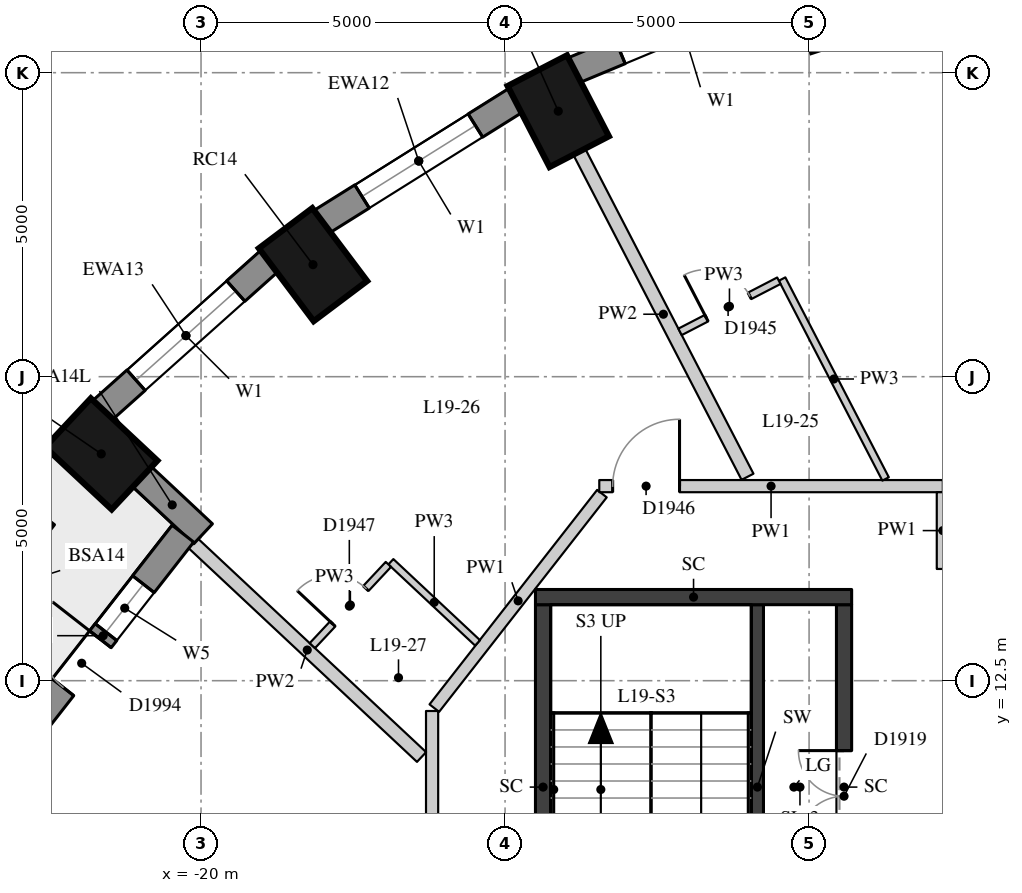
"""IFC4 building model, lengths in metres.
Left out: names, types, materials, properties, quantities, classifications, styles, units other than length and angle.
Written with IfcOpenShell. Run it as: python <this file> out.ifc"""

import sys

from ifc_helpers import new_model, si_unit, direction, frame, frame_2d, origin, origin_2d, place, context, subcontext, project, spatial, rectangle, extrude, element, fill, save


model = new_model("IFC4")
c1 = context("Model", 3, precision=1e-05, world=origin(), true_north=direction((0.0, 1.0)))
c2 = subcontext(c1, "Body", "Model", "MODEL_VIEW")
j1 = project(units=[si_unit("LENGTHUNIT", "METRE"), si_unit("PLANEANGLEUNIT", "RADIAN")], contexts=[c1])
p1 = place(None, origin())
s1 = spatial("IfcSite", under=j1, at=p1, CompositionType="ELEMENT")
p2 = place(p1, origin())
s2 = spatial("IfcBuilding", under=s1, at=p2, CompositionType="ELEMENT")
p3 = place(p2, frame((0.0, 0.0, 71.2)))
s3 = spatial("IfcBuildingStorey", under=s2, at=p3, CompositionType="ELEMENT", Elevation=71.2)
for number, where, z_axis, x_axis in (
    (1, (-14.125, 21.867, 0.0), (0.0, 0.0, 1.0), (-0.46, 0.888, 0.0)),
    (2, (-18.159, 19.343, 0.0), (0.0, 0.0, 1.0), (-0.601, 0.799, 0.0)),
    (3, (-21.641, 16.23, 0.0), (0.0, 0.0, 1.0), (-0.73, 0.683, 0.0)),
):
    element("IfcColumn", number, at=place(p3, frame(where, z_axis=z_axis, x_axis=x_axis)), inside=s3, PredefinedType="COLUMN", context=c2, shape_type="SweptSolid", body=[
        extrude(rectangle(XDim=1.5, YDim=1.1, at=origin_2d()), origin(), (0.0, 0.0, 1.0), 3.3),
    ])
p4 = place(p3, frame((-10.315, 24.021, 0.0), z_axis=(0.0, 0.0, 1.0), x_axis=(-0.923031964282, -0.384723267966, 0.0)))
e4 = element("IfcWall", 4, at=p4, inside=s3, PredefinedType="SOLIDWALL", context=c2, shape_type="SweptSolid", body=[
    extrude(rectangle(XDim=3.856, YDim=0.45, at=frame_2d((1.928, 0.0))), origin(), (0.0, 0.0, 1.0), 3.02),
])
p5 = place(p4, frame((0.828, 0.0, 0.4)))
e5 = element("IfcOpeningElement", 5, at=p5, cuts=e4, PredefinedType="OPENING", context=c2, shape_type="SweptSolid", body=[
    extrude(rectangle(XDim=2.2, YDim=1.75, at=frame_2d((1.1, 0.875))), frame((0.0, 0.235, 0.0), z_axis=(0.0, -1.0, 0.0), x_axis=(1.0, 0.0, 0.0)), (0.0, 0.0, 1.0), 0.47),
])
p6 = place(p3, frame((-14.817, 22.051, 0.0), z_axis=(0.0, 0.0, 1.0), x_axis=(-0.847635480093, -0.530579016629, 0.0)))
e6 = element("IfcWall", 6, at=p6, inside=s3, PredefinedType="SOLIDWALL", context=c2, shape_type="SweptSolid", body=[
    extrude(rectangle(XDim=3.782, YDim=0.45, at=frame_2d((1.891, 0.0))), origin(), (0.0, 0.0, 1.0), 3.02),
])
p7 = place(p6, frame((0.791, 0.0, 0.4)))
e7 = element("IfcOpeningElement", 7, at=p7, cuts=e6, PredefinedType="OPENING", context=c2, shape_type="SweptSolid", body=[
    extrude(rectangle(XDim=2.2, YDim=1.75, at=frame_2d((1.1, 0.875))), frame((0.0, 0.235, 0.0), z_axis=(0.0, -1.0, 0.0), x_axis=(1.0, 0.0, 0.0)), (0.0, 0.0, 1.0), 0.47),
])
p8 = place(p3, frame((-18.871, 19.407, 0.0), z_axis=(0.0, 0.0, 1.0), x_axis=(-0.745526233716, -0.66647628228, 0.0)))
e8 = element("IfcWall", 8, at=p8, inside=s3, PredefinedType="SOLIDWALL", context=c2, shape_type="SweptSolid", body=[
    extrude(rectangle(XDim=3.697, YDim=0.45, at=frame_2d((1.848, 0.0))), origin(), (0.0, 0.0, 1.0), 3.02),
])
p9 = place(p8, frame((0.749, 0.0, 0.4)))
e9 = element("IfcOpeningElement", 9, at=p9, cuts=e8, PredefinedType="OPENING", context=c2, shape_type="SweptSolid", body=[
    extrude(rectangle(XDim=2.2, YDim=1.75, at=frame_2d((1.1, 0.875))), frame((0.0, 0.235, 0.0), z_axis=(0.0, -1.0, 0.0), x_axis=(1.0, 0.0, 0.0)), (0.0, 0.0, 1.0), 0.47),
])
p10 = place(p3, frame((-20.982, 15.866, 0.0), z_axis=(0.0, 0.0, 1.0), x_axis=(0.730062381614, -0.683380508174, 0.0)))
e10 = element("IfcWall", 10, at=p10, inside=s3, PredefinedType="SOLIDWALL", context=c2, shape_type="SweptSolid", body=[
    extrude(rectangle(XDim=1.391, YDim=0.45, at=frame_2d((0.696, 0.0))), origin(), (0.0, 0.0, 1.0), 3.02),
])
p11 = place(p3, frame((-20.298, 14.918, 0.0), z_axis=(0.0, 0.0, 1.0), x_axis=(-0.615578403957, -0.788075649022, 0.0)))
e11 = element("IfcWall", 11, at=p11, inside=s3, PredefinedType="SOLIDWALL", context=c2, shape_type="SweptSolid", body=[
    extrude(rectangle(XDim=4.259, YDim=0.45, at=frame_2d((2.129, 0.0))), origin(), (0.0, 0.0, 1.0), 3.02),
])
p12 = place(p11, frame((1.054, 0.0, 0.4)))
e12 = element("IfcOpeningElement", 12, at=p12, cuts=e11, PredefinedType="OPENING", context=c2, shape_type="SweptSolid", body=[
    extrude(rectangle(XDim=1.0, YDim=1.75, at=frame_2d((0.5, 0.875))), frame((0.0, 0.235, 0.0), z_axis=(0.0, -1.0, 0.0), x_axis=(1.0, 0.0, 0.0)), (0.0, 0.0, 1.0), 0.47),
])
p13 = place(p11, frame((2.204, 0.0, 0.0)))
e13 = element("IfcOpeningElement", 13, at=p13, cuts=e11, PredefinedType="OPENING", context=c2, shape_type="SweptSolid", body=[
    extrude(rectangle(XDim=1.0, YDim=2.15, at=frame_2d((0.5, 1.075))), frame((0.0, 0.235, 0.0), z_axis=(0.0, -1.0, 0.0), x_axis=(1.0, 0.0, 0.0)), (0.0, 0.0, 1.0), 0.47),
])
p14 = place(p3, frame((-22.686, 15.281, 0.0), z_axis=(0.0, 0.0, 1.0), x_axis=(-0.616622746332, -0.787258781282, 0.0)))
e14 = element("IfcWall", 14, at=p14, inside=s3, PredefinedType="USERDEFINED", context=c2, shape_type="SweptSolid", body=[
    extrude(rectangle(XDim=1.8, YDim=0.7, at=frame_2d((0.9, 0.0))), origin(), (0.0, 0.0, 1.0), 0.75),
])
p15 = place(p3, frame((-10.85, 7.75, 0.0), z_axis=(0.0, 0.0, 1.0), x_axis=(0.0, 1.0, 0.0)))
e15 = element("IfcWall", 15, at=p15, inside=s3, PredefinedType="SHEAR", context=c2, shape_type="SweptSolid", body=[
    extrude(rectangle(XDim=6.0, YDim=0.2, at=frame_2d((3.0, 0.0))), origin(), (0.0, 0.0, 1.0), 3.02),
])
p16 = place(p15, frame((0.1, 0.0, 0.0)))
e16 = element("IfcOpeningElement", 16, at=p16, cuts=e15, PredefinedType="OPENING", context=c2, shape_type="SweptSolid", body=[
    extrude(rectangle(XDim=1.5, YDim=2.1, at=frame_2d((0.75, 1.05))), frame((0.0, 0.11, 0.0), z_axis=(0.0, -1.0, 0.0), x_axis=(1.0, 0.0, 0.0)), (0.0, 0.0, 1.0), 0.22),
])
p17 = place(p3, frame((-14.375, 7.75, -0.28), z_axis=(0.0, 0.0, 1.0), x_axis=(0.0, 1.0, 0.0)))
e17 = element("IfcWall", 17, at=p17, inside=s3, PredefinedType="SHEAR", context=c2, shape_type="SweptSolid", body=[
    extrude(rectangle(XDim=6.0, YDim=0.25, at=frame_2d((3.0, 0.0))), origin(), (0.0, 0.0, 1.0), 3.3),
])
p18 = place(p3, frame((-9.425, 7.75, -0.28), z_axis=(0.0, 0.0, 1.0), x_axis=(0.0, 1.0, 0.0)))
e18 = element("IfcWall", 18, at=p18, inside=s3, PredefinedType="SHEAR", context=c2, shape_type="SweptSolid", body=[
    extrude(rectangle(XDim=6.0, YDim=0.25, at=frame_2d((3.0, 0.0))), origin(), (0.0, 0.0, 1.0), 3.3),
])
p19 = place(p18, frame((2.1, 0.0, 0.28)))
e19 = element("IfcOpeningElement", 19, at=p19, cuts=e18, PredefinedType="OPENING", context=c2, shape_type="SweptSolid", body=[
    extrude(rectangle(XDim=1.5, YDim=2.1, at=frame_2d((0.75, 1.05))), frame((0.0, 0.135, 0.0), z_axis=(0.0, -1.0, 0.0), x_axis=(1.0, 0.0, 0.0)), (0.0, 0.0, 1.0), 0.27),
])
p20 = place(p3, frame((-14.5, 13.875, -0.28), z_axis=(0.0, 0.0, 1.0), x_axis=(1.0, 0.0, 0.0)))
e20 = element("IfcWall", 20, at=p20, inside=s3, PredefinedType="SHEAR", context=c2, shape_type="SweptSolid", body=[
    extrude(rectangle(XDim=5.2, YDim=0.25, at=frame_2d((2.6, 0.0))), origin(), (0.0, 0.0, 1.0), 3.3),
])
p21 = place(p3, frame((-16.2, 7.298, 0.0), z_axis=(0.0, 0.0, 1.0), x_axis=(0.0, 1.0, 0.0)))
e21 = element("IfcWall", 21, at=p21, inside=s3, PredefinedType="PARTITIONING", context=c2, shape_type="SweptSolid", body=[
    extrude(rectangle(XDim=4.703, YDim=0.2, at=frame_2d((2.352, 0.0))), origin(), (0.0, 0.0, 1.0), 3.02),
])
p22 = place(p3, frame((-16.163, 12.049, 0.0), z_axis=(0.0, 0.0, 1.0), x_axis=(0.6157435057, 0.787946657578, 0.0)))
e22 = element("IfcWall", 22, at=p22, inside=s3, PredefinedType="PARTITIONING", context=c2, shape_type="SweptSolid", body=[
    extrude(rectangle(XDim=4.477, YDim=0.2, at=frame_2d((2.239, 0.0))), origin(), (0.0, 0.0, 1.0), 3.02),
])
p23 = place(p3, frame((-13.45, 15.7, 0.0), z_axis=(0.0, 0.0, 1.0), x_axis=(1.0, 0.0, 0.0)))
e23 = element("IfcWall", 23, at=p23, inside=s3, PredefinedType="PARTITIONING", context=c2, shape_type="SweptSolid", body=[
    extrude(rectangle(XDim=5.65, YDim=0.2, at=frame_2d((2.825, 0.0))), origin(), (0.0, 0.0, 1.0), 3.02),
])
p24 = place(p23, frame((0.22, 0.0, 0.0)))
e24 = element("IfcOpeningElement", 24, at=p24, cuts=e23, PredefinedType="OPENING", context=c2, shape_type="SweptSolid", body=[
    extrude(rectangle(XDim=1.1, YDim=2.1, at=frame_2d((0.55, 1.05))), frame((0.0, 0.11, 0.0), z_axis=(0.0, -1.0, 0.0), x_axis=(1.0, 0.0, 0.0)), (0.0, 0.0, 1.0), 0.22),
])
p25 = place(p3, frame((-7.8, 15.6, 0.0), z_axis=(0.0, 0.0, 1.0), x_axis=(0.0, -1.0, 0.0)))
e25 = element("IfcWall", 25, at=p25, inside=s3, PredefinedType="PARTITIONING", context=c2, shape_type="SweptSolid", body=[
    extrude(rectangle(XDim=1.262, YDim=0.2, at=frame_2d((0.631, 0.0))), origin(), (0.0, 0.0, 1.0), 3.02),
])
p26 = place(p3, frame((-13.78, 21.201, 0.0), z_axis=(0.0, 0.0, 1.0), x_axis=(0.459689820266, -0.888079539875, 0.0)))
e26 = element("IfcWall", 26, at=p26, inside=s3, PredefinedType="PARTITIONING", context=c2, shape_type="SweptSolid", body=[
    extrude(rectangle(XDim=6.021, YDim=0.22, at=frame_2d((3.011, 0.0))), origin(), (0.0, 0.0, 1.0), 3.02),
])
p27 = place(p3, frame((-20.133, 14.764, 0.0), z_axis=(0.0, 0.0, 1.0), x_axis=(0.730092856427, -0.683347950165, 0.0)))
e27 = element("IfcWall", 27, at=p27, inside=s3, PredefinedType="PARTITIONING", context=c2, shape_type="SweptSolid", body=[
    extrude(rectangle(XDim=5.15, YDim=0.22, at=frame_2d((2.575, 0.0))), origin(), (0.0, 0.0, 1.0), 3.02),
])
p28 = place(p3, frame((-8.742, 15.818, 0.0), z_axis=(0.0, 0.0, 1.0), x_axis=(-0.45967225044, 0.888088634189, 0.0)))
e28 = element("IfcWall", 28, at=p28, inside=s3, PredefinedType="PARTITIONING", context=c2, shape_type="SweptSolid", body=[
    extrude(rectangle(XDim=3.702, YDim=0.12, at=frame_2d((1.851, 0.0))), origin(), (0.0, 0.0, 1.0), 3.02),
])
p29 = place(p3, frame((-15.452, 13.122, 0.0), z_axis=(0.0, 0.0, 1.0), x_axis=(-0.730035995084, 0.683408696083, 0.0)))
e29 = element("IfcWall", 29, at=p29, inside=s3, PredefinedType="PARTITIONING", context=c2, shape_type="SweptSolid", body=[
    extrude(rectangle(XDim=1.953, YDim=0.12, at=frame_2d((0.977, 0.0))), origin(), (0.0, 0.0, 1.0), 3.02),
])
p30 = place(p3, frame((-10.497, 19.078, 0.0), z_axis=(0.0, 0.0, 1.0), x_axis=(-0.888095574179, -0.459658842104, 0.0)))
e30 = element("IfcWall", 30, at=p30, inside=s3, PredefinedType="PARTITIONING", context=c2, shape_type="SweptSolid", body=[
    extrude(rectangle(XDim=1.83, YDim=0.12, at=frame_2d((0.915, 0.0))), origin(), (0.0, 0.0, 1.0), 3.02),
])
p31 = place(p30, frame((0.54, 0.0, 0.0)))
e31 = element("IfcOpeningElement", 31, at=p31, cuts=e30, PredefinedType="OPENING", context=c2, shape_type="SweptSolid", body=[
    extrude(rectangle(XDim=0.8, YDim=2.1, at=frame_2d((0.4, 1.05))), frame((0.0, 0.07, 0.0), z_axis=(0.0, -1.0, 0.0), x_axis=(1.0, 0.0, 0.0)), (0.0, 0.0, 1.0), 0.14),
])
p32 = place(p3, frame((-16.919, 14.413, 0.0), z_axis=(0.0, 0.0, 1.0), x_axis=(-0.683306289544, -0.730131847456, 0.0)))
e32 = element("IfcWall", 32, at=p32, inside=s3, PredefinedType="PARTITIONING", context=c2, shape_type="SweptSolid", body=[
    extrude(rectangle(XDim=1.83, YDim=0.12, at=frame_2d((0.915, 0.0))), origin(), (0.0, 0.0, 1.0), 3.02),
])
p33 = place(p32, frame((0.54, 0.0, 0.0)))
e33 = element("IfcOpeningElement", 33, at=p33, cuts=e32, PredefinedType="OPENING", context=c2, shape_type="SweptSolid", body=[
    extrude(rectangle(XDim=0.8, YDim=2.1, at=frame_2d((0.4, 1.05))), frame((0.0, 0.07, 0.0), z_axis=(0.0, -1.0, 0.0), x_axis=(1.0, 0.0, 0.0)), (0.0, 0.0, 1.0), 0.14),
])
p34 = place(p5, origin())
e34 = element("IfcWindow", 34, at=p34, inside=s3, PartitioningType="SINGLE_PANEL", PredefinedType="WINDOW", context=c2, shape_type="SweptSolid", body=[
    extrude(rectangle(XDim=2.2, YDim=1.75, at=frame_2d((1.1, 0.875))), frame((0.0, 0.035, 0.0), z_axis=(0.0, -1.0, 0.0), x_axis=(1.0, 0.0, 0.0)), (0.0, 0.0, 1.0), 0.06),
])
fill(e5, e34)
p35 = place(p7, origin())
e35 = element("IfcWindow", 35, at=p35, inside=s3, PartitioningType="SINGLE_PANEL", PredefinedType="WINDOW", context=c2, shape_type="SweptSolid", body=[
    extrude(rectangle(XDim=2.2, YDim=1.75, at=frame_2d((1.1, 0.875))), frame((0.0, 0.035, 0.0), z_axis=(0.0, -1.0, 0.0), x_axis=(1.0, 0.0, 0.0)), (0.0, 0.0, 1.0), 0.06),
])
fill(e7, e35)
p36 = place(p9, origin())
e36 = element("IfcWindow", 36, at=p36, inside=s3, PartitioningType="SINGLE_PANEL", PredefinedType="WINDOW", context=c2, shape_type="SweptSolid", body=[
    extrude(rectangle(XDim=2.2, YDim=1.75, at=frame_2d((1.1, 0.875))), frame((0.0, 0.035, 0.0), z_axis=(0.0, -1.0, 0.0), x_axis=(1.0, 0.0, 0.0)), (0.0, 0.0, 1.0), 0.06),
])
fill(e9, e36)
p37 = place(p12, origin())
e37 = element("IfcWindow", 37, at=p37, inside=s3, PartitioningType="SINGLE_PANEL", PredefinedType="WINDOW", context=c2, shape_type="SweptSolid", body=[
    extrude(rectangle(XDim=1.0, YDim=1.75, at=frame_2d((0.5, 0.875))), frame((0.0, 0.035, 0.0), z_axis=(0.0, -1.0, 0.0), x_axis=(1.0, 0.0, 0.0)), (0.0, 0.0, 1.0), 0.06),
])
fill(e12, e37)
p38 = place(p13, frame((1.0, 0.0, 0.0), z_axis=(0.0, 0.0, 1.0), x_axis=(-1.0, 0.0, 0.0)))
e38 = element("IfcDoor", 38, at=p38, inside=s3, OperationType="SINGLE_SWING_RIGHT", PredefinedType="DOOR", context=c2, shape_type="SweptSolid", body=[
    extrude(rectangle(XDim=1.0, YDim=2.15, at=frame_2d((0.5, 1.075))), frame((0.0, 0.075, 0.0), z_axis=(0.0, -1.0, 0.0), x_axis=(1.0, 0.0, 0.0)), (0.0, 0.0, 1.0), 0.05),
])
fill(e13, e38)
p39 = place(p19, origin())
e39 = element("IfcDoor", 39, at=p39, inside=s3, OperationType="DOUBLE_DOOR_SINGLE_SWING", PredefinedType="DOOR", context=c2, shape_type="SweptSolid", body=[
    extrude(rectangle(XDim=1.5, YDim=2.1, at=frame_2d((0.75, 1.05))), frame((0.0, 0.025, 0.0), z_axis=(0.0, -1.0, 0.0), x_axis=(1.0, 0.0, 0.0)), (0.0, 0.0, 1.0), 0.05),
])
fill(e19, e39)
p40 = place(p31, origin())
e40 = element("IfcDoor", 40, at=p40, inside=s3, OperationType="SINGLE_SWING_LEFT", PredefinedType="DOOR", context=c2, shape_type="SweptSolid", body=[
    extrude(rectangle(XDim=0.8, YDim=2.1, at=frame_2d((0.4, 1.05))), frame((0.0, 0.025, 0.0), z_axis=(0.0, -1.0, 0.0), x_axis=(1.0, 0.0, 0.0)), (0.0, 0.0, 1.0), 0.05),
])
fill(e31, e40)
p41 = place(p24, origin())
e41 = element("IfcDoor", 41, at=p41, inside=s3, OperationType="SINGLE_SWING_RIGHT", PredefinedType="DOOR", context=c2, shape_type="SweptSolid", body=[
    extrude(rectangle(XDim=1.1, YDim=2.1, at=frame_2d((0.55, 1.05))), frame((0.0, 0.025, 0.0), z_axis=(0.0, -1.0, 0.0), x_axis=(1.0, 0.0, 0.0)), (0.0, 0.0, 1.0), 0.05),
])
fill(e24, e41)
p42 = place(p33, origin())
e42 = element("IfcDoor", 42, at=p42, inside=s3, OperationType="SINGLE_SWING_LEFT", PredefinedType="DOOR", context=c2, shape_type="SweptSolid", body=[
    extrude(rectangle(XDim=0.8, YDim=2.1, at=frame_2d((0.4, 1.05))), frame((0.0, 0.025, 0.0), z_axis=(0.0, -1.0, 0.0), x_axis=(1.0, 0.0, 0.0)), (0.0, 0.0, 1.0), 0.05),
])
fill(e33, e42)
save(model, sys.argv[1])
